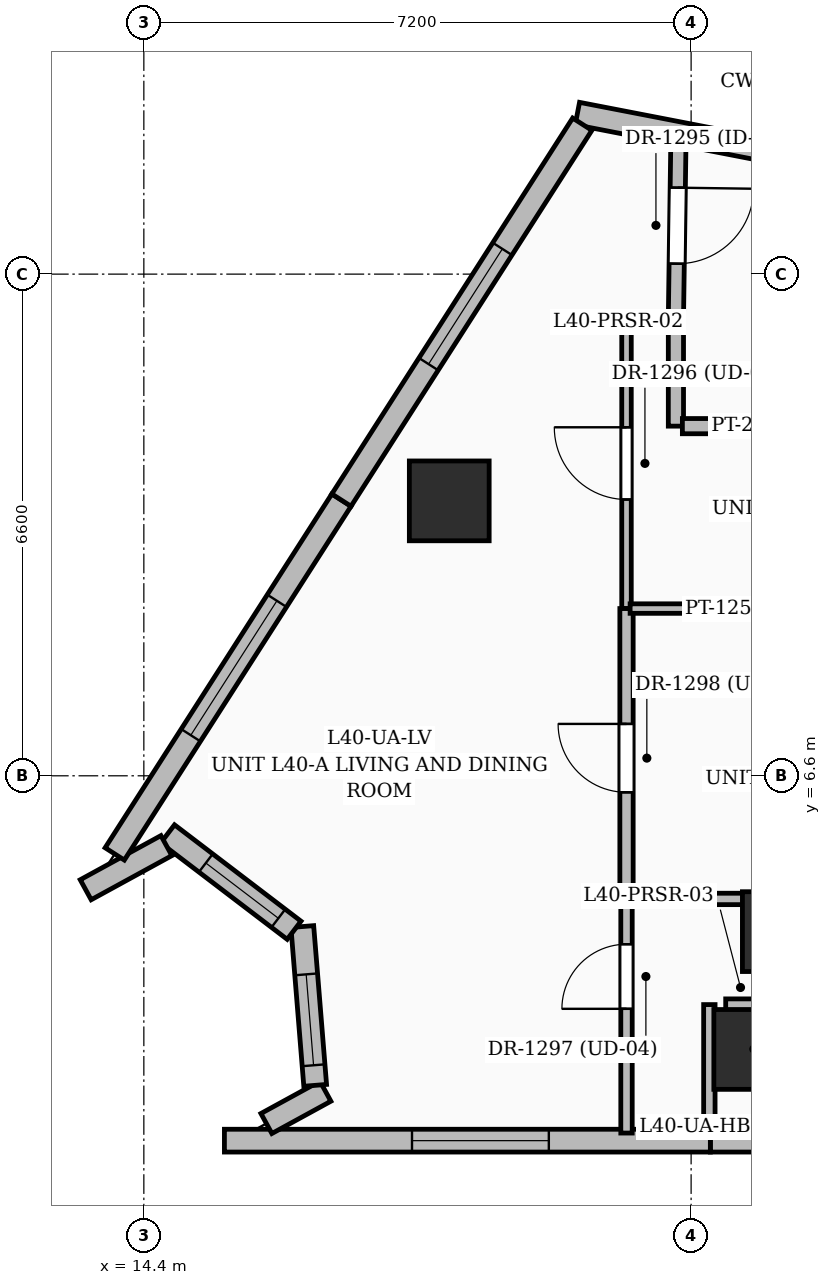
"""IFC4 building model, lengths in metres.
Left out: names, types, materials, properties, quantities, classifications, styles, units other than length and angle.
Written with IfcOpenShell. Run it as: python <this file> out.ifc"""

import sys

from ifc_helpers import new_model, si_unit, direction, frame, frame_2d, origin, origin_2d, place, context, subcontext, project, spatial, rectangle, extrude, element, fill, save


model = new_model("IFC4")
c1 = context("Model", 3, precision=1e-05, world=origin(), true_north=direction((0.0, 1.0)))
c2 = subcontext(c1, "Body", "Model", "MODEL_VIEW")
j1 = project(units=[si_unit("LENGTHUNIT", "METRE"), si_unit("PLANEANGLEUNIT", "RADIAN")], contexts=[c1])
p1 = place(None, origin())
s1 = spatial("IfcSite", under=j1, at=p1, CompositionType="ELEMENT")
p2 = place(p1, origin())
s2 = spatial("IfcBuilding", under=s1, at=p2, CompositionType="ELEMENT")
p3 = place(p2, frame((0.0, 0.0, 157.2)))
s3 = spatial("IfcBuildingStorey", under=s2, at=p3, CompositionType="ELEMENT", Elevation=157.2)
for number, where, z_axis, x_axis in (
    (1, (22.8, 4.55, 0.0), (0.0, 0.0, 1.0), (1.0, 0.0, 0.0)),
    (2, (22.424, 3.0, 0.0), (0.0, 0.0, 1.0), (1.0, 0.0, 0.0)),
    (3, (18.418, 10.217, 0.0), (0.0, 0.0, 1.0), (1.0, 0.0, 0.0)),
):
    element("IfcColumn", number, at=place(p3, frame(where, z_axis=z_axis, x_axis=x_axis)), inside=s3, PredefinedType="COLUMN", context=c2, shape_type="SweptSolid", body=[
        extrude(rectangle(XDim=1.05, YDim=1.05, at=origin_2d()), origin(), (0.0, 0.0, 1.0), 3.6),
    ])
p4 = place(p3, frame((20.104, 15.312, 0.0), z_axis=(0.0, 0.0, 1.0), x_axis=(0.98176398898, -0.190103839891, 0.0)))
e4 = element("IfcWall", 4, at=p4, inside=s3, PredefinedType="SOLIDWALL", context=c2, shape_type="SweptSolid", body=[
    extrude(rectangle(XDim=2.594, YDim=0.3, at=frame_2d((1.297, 0.0))), origin(), (0.0, 0.0, 1.0), 2.575),
])
p5 = place(p3, frame((28.246, 1.8, 0.0), z_axis=(0.0, 0.0, 1.0), x_axis=(-1.0, 0.0, 0.0)))
e5 = element("IfcWall", 5, at=p5, inside=s3, PredefinedType="SOLIDWALL", context=c2, shape_type="SweptSolid", body=[
    extrude(rectangle(XDim=6.393, YDim=0.3, at=frame_2d((3.197, 0.0))), origin(), (0.0, 0.0, 1.0), 3.35),
])
p6 = place(p5, frame((2.35, 0.0, 0.55)))
e6 = element("IfcOpeningElement", 6, at=p6, cuts=e5, PredefinedType="OPENING", context=c2, shape_type="SweptSolid", body=[
    extrude(rectangle(XDim=2.1, YDim=2.4, at=frame_2d((1.05, 1.2))), frame((0.0, 0.16, 0.0), z_axis=(0.0, -1.0, 0.0), x_axis=(1.0, 0.0, 0.0)), (0.0, 0.0, 1.0), 0.32),
])
p7 = place(p3, frame((21.853, 1.8, 0.0), z_axis=(0.0, 0.0, 1.0), x_axis=(-1.0, 0.0, 0.0)))
e7 = element("IfcWall", 7, at=p7, inside=s3, PredefinedType="SOLIDWALL", context=c2, shape_type="SweptSolid", body=[
    extrude(rectangle(XDim=6.393, YDim=0.3, at=frame_2d((3.197, 0.0))), origin(), (0.0, 0.0, 1.0), 3.35),
])
p8 = place(p7, frame((2.125, 0.0, 0.6)))
e8 = element("IfcOpeningElement", 8, at=p8, cuts=e7, PredefinedType="OPENING", context=c2, shape_type="SweptSolid", body=[
    extrude(rectangle(XDim=1.8, YDim=2.1, at=frame_2d((0.9, 1.05))), frame((0.0, 0.16, 0.0), z_axis=(0.0, -1.0, 0.0), x_axis=(1.0, 0.0, 0.0)), (0.0, 0.0, 1.0), 0.32),
])
p9 = place(p3, frame((16.012, 2.025, 0.0), z_axis=(0.0, 0.0, 1.0), x_axis=(0.877262241919, 0.480011415389, 0.0)))
e9 = element("IfcWall", 9, at=p9, inside=s3, PredefinedType="SOLIDWALL", context=c2, shape_type="SweptSolid", body=[
    extrude(rectangle(XDim=0.885, YDim=0.3, at=frame_2d((0.442, 0.0))), origin(), (0.0, 0.0, 1.0), 3.35),
])
p10 = place(p3, frame((16.654, 2.528, 0.0), z_axis=(0.0, 0.0, 1.0), x_axis=(-0.080962879454, 0.996717117416, 0.0)))
e10 = element("IfcWall", 10, at=p10, inside=s3, PredefinedType="SOLIDWALL", context=c2, shape_type="SweptSolid", body=[
    extrude(rectangle(XDim=2.096, YDim=0.3, at=frame_2d((1.048, 0.0))), origin(), (0.0, 0.0, 1.0), 3.35),
])
p11 = place(p10, frame((0.265, 0.0, 0.8)))
e11 = element("IfcOpeningElement", 11, at=p11, cuts=e10, PredefinedType="OPENING", context=c2, shape_type="SweptSolid", body=[
    extrude(rectangle(XDim=1.2, YDim=1.8, at=frame_2d((0.6, 0.9))), frame((0.0, 0.16, 0.0), z_axis=(0.0, -1.0, 0.0), x_axis=(1.0, 0.0, 0.0)), (0.0, 0.0, 1.0), 0.32),
])
p12 = place(p3, frame((16.377, 4.568, 0.0), z_axis=(0.0, 0.0, 1.0), x_axis=(-0.795383499791, 0.606106499107, 0.0)))
e12 = element("IfcWall", 12, at=p12, inside=s3, PredefinedType="SOLIDWALL", context=c2, shape_type="SweptSolid", body=[
    extrude(rectangle(XDim=2.092, YDim=0.3, at=frame_2d((1.046, 0.0))), origin(), (0.0, 0.0, 1.0), 3.35),
])
p13 = place(p12, frame((0.26, 0.0, 0.8)))
e13 = element("IfcOpeningElement", 13, at=p13, cuts=e12, PredefinedType="OPENING", context=c2, shape_type="SweptSolid", body=[
    extrude(rectangle(XDim=1.2, YDim=1.8, at=frame_2d((0.6, 0.9))), frame((0.0, 0.16, 0.0), z_axis=(0.0, -1.0, 0.0), x_axis=(1.0, 0.0, 0.0)), (0.0, 0.0, 1.0), 0.32),
])
p14 = place(p3, frame((14.697, 5.681, 0.0), z_axis=(0.0, 0.0, 1.0), x_axis=(-0.877355211776, -0.47984146587, 0.0)))
e14 = element("IfcWall", 14, at=p14, inside=s3, PredefinedType="SOLIDWALL", context=c2, shape_type="SweptSolid", body=[
    extrude(rectangle(XDim=1.21, YDim=0.3, at=frame_2d((0.605, 0.0))), origin(), (0.0, 0.0, 1.0), 3.35),
])
p15 = place(p3, frame((14.017, 5.572, 0.0), z_axis=(0.0, 0.0, 1.0), x_axis=(0.539464660722, 0.84200824214, 0.0)))
e15 = element("IfcWall", 15, at=p15, inside=s3, PredefinedType="SOLIDWALL", context=c2, shape_type="SweptSolid", body=[
    extrude(rectangle(XDim=5.529, YDim=0.3, at=frame_2d((2.764, 0.0))), origin(), (0.0, 0.0, 1.0), 3.35),
])
p16 = place(p15, frame((1.855, 0.0, 0.55)))
e16 = element("IfcOpeningElement", 16, at=p16, cuts=e15, PredefinedType="OPENING", context=c2, shape_type="SweptSolid", body=[
    extrude(rectangle(XDim=2.1, YDim=2.4, at=frame_2d((1.05, 1.2))), frame((0.0, 0.16, 0.0), z_axis=(0.0, -1.0, 0.0), x_axis=(1.0, 0.0, 0.0)), (0.0, 0.0, 1.0), 0.32),
])
p17 = place(p3, frame((17.0, 10.227, 0.0), z_axis=(0.0, 0.0, 1.0), x_axis=(0.539500668401, 0.841985171363, 0.0)))
e17 = element("IfcWall", 17, at=p17, inside=s3, PredefinedType="SOLIDWALL", context=c2, shape_type="SweptSolid", body=[
    extrude(rectangle(XDim=5.873, YDim=0.3, at=frame_2d((2.937, 0.0))), origin(), (0.0, 0.0, 1.0), 3.35),
])
p18 = place(p17, frame((2.125, 0.0, 0.6)))
e18 = element("IfcOpeningElement", 18, at=p18, cuts=e17, PredefinedType="OPENING", context=c2, shape_type="SweptSolid", body=[
    extrude(rectangle(XDim=1.8, YDim=2.1, at=frame_2d((0.9, 1.05))), frame((0.0, 0.16, 0.0), z_axis=(0.0, -1.0, 0.0), x_axis=(1.0, 0.0, 0.0)), (0.0, 0.0, 1.0), 0.32),
])
p19 = place(p3, frame((21.433, 14.956, 0.0), z_axis=(0.0, 0.0, 1.0), x_axis=(-0.014212611143, -0.999898995741, 0.0)))
e19 = element("IfcWall", 19, at=p19, inside=s3, PredefinedType="PARTITIONING", context=c2, shape_type="SweptSolid", body=[
    extrude(rectangle(XDim=2.336, YDim=0.2, at=frame_2d((1.168, 0.0))), origin(), (0.0, 0.0, 1.0), 2.57),
])
p20 = place(p19, frame((0.619, 0.0, 0.0)))
e20 = element("IfcOpeningElement", 20, at=p20, cuts=e19, PredefinedType="OPENING", context=c2, shape_type="SweptSolid", body=[
    extrude(rectangle(XDim=1.0, YDim=2.2, at=frame_2d((0.5, 1.1))), frame((0.0, 0.11, 0.0), z_axis=(0.0, -1.0, 0.0), x_axis=(1.0, 0.0, 0.0)), (0.0, 0.0, 1.0), 0.22),
])
p21 = place(p3, frame((21.4, 12.62, 0.0), z_axis=(0.0, 0.0, 1.0), x_axis=(0.0, -1.0, 0.0)))
e21 = element("IfcWall", 21, at=p21, inside=s3, PredefinedType="PARTITIONING", context=c2, shape_type="SweptSolid", body=[
    extrude(rectangle(XDim=1.42, YDim=0.2, at=frame_2d((0.71, 0.0))), origin(), (0.0, 0.0, 1.0), 3.35),
])
p22 = place(p3, frame((21.485, 11.2, 0.0), z_axis=(0.0, 0.0, 1.0), x_axis=(1.0, 0.0, 0.0)))
e22 = element("IfcWall", 22, at=p22, inside=s3, PredefinedType="PARTITIONING", context=c2, shape_type="SweptSolid", body=[
    extrude(rectangle(XDim=3.384, YDim=0.2, at=frame_2d((1.692, 0.0))), origin(), (0.0, 0.0, 1.0), 3.35),
])
p23 = place(p3, frame((20.75, 1.9, 0.0), z_axis=(0.0, 0.0, 1.0), x_axis=(0.0, 1.0, 0.0)))
e23 = element("IfcWall", 23, at=p23, inside=s3, PredefinedType="PARTITIONING", context=c2, shape_type="SweptSolid", body=[
    extrude(rectangle(XDim=3.08, YDim=0.15, at=frame_2d((1.54, 0.0))), origin(), (0.0, 0.0, 1.0), 3.35),
])
p24 = place(p23, frame((1.635, 0.0, 0.0)))
e24 = element("IfcOpeningElement", 24, at=p24, cuts=e23, PredefinedType="OPENING", context=c2, shape_type="SweptSolid", body=[
    extrude(rectangle(XDim=0.85, YDim=2.1, at=frame_2d((0.425, 1.05))), frame((0.0, 0.085, 0.0), z_axis=(0.0, -1.0, 0.0), x_axis=(1.0, 0.0, 0.0)), (0.0, 0.0, 1.0), 0.17),
])
p25 = place(p3, frame((20.75, 8.8, 0.0), z_axis=(0.0, 0.0, 1.0), x_axis=(0.0, 1.0, 0.0)))
e25 = element("IfcWall", 25, at=p25, inside=s3, PredefinedType="PARTITIONING", context=c2, shape_type="SweptSolid", body=[
    extrude(rectangle(XDim=3.82, YDim=0.125, at=frame_2d((1.91, 0.0))), origin(), (0.0, 0.0, 1.0), 2.393),
])
p26 = place(p25, frame((1.435, 0.0, 0.0)))
e26 = element("IfcOpeningElement", 26, at=p26, cuts=e25, PredefinedType="OPENING", context=c2, shape_type="SweptSolid", body=[
    extrude(rectangle(XDim=0.95, YDim=2.2, at=frame_2d((0.475, 1.1))), frame((0.0, 0.072, 0.0), z_axis=(0.0, -1.0, 0.0), x_axis=(1.0, 0.0, 0.0)), (0.0, 0.0, 1.0), 0.145),
])
p27 = place(p3, frame((20.798, 12.62, 0.0), z_axis=(0.0, 0.0, 1.0), x_axis=(1.0, 0.0, 0.0)))
e27 = element("IfcWall", 27, at=p27, inside=s3, PredefinedType="PARTITIONING", context=c2, shape_type="SweptSolid", body=[
    extrude(rectangle(XDim=0.517, YDim=0.125, at=frame_2d((0.259, 0.0))), origin(), (0.0, 0.0, 1.0), 3.35),
])
p28 = place(p3, frame((20.75, 4.98, 0.0), z_axis=(0.0, 0.0, 1.0), x_axis=(0.0, 1.0, 0.0)))
e28 = element("IfcWall", 28, at=p28, inside=s3, PredefinedType="PARTITIONING", context=c2, shape_type="SweptSolid", body=[
    extrude(rectangle(XDim=3.82, YDim=0.175, at=frame_2d((1.91, 0.0))), origin(), (0.0, 0.0, 1.0), 2.57),
])
p29 = place(p28, frame((1.403, 0.0, 0.0)))
e29 = element("IfcOpeningElement", 29, at=p29, cuts=e28, PredefinedType="OPENING", context=c2, shape_type="SweptSolid", body=[
    extrude(rectangle(XDim=0.9, YDim=2.15, at=frame_2d((0.45, 1.075))), frame((0.0, 0.097, 0.0), z_axis=(0.0, -1.0, 0.0), x_axis=(1.0, 0.0, 0.0)), (0.0, 0.0, 1.0), 0.195),
])
p30 = place(p3, frame((27.175, 4.98, 0.0), z_axis=(0.0, 0.0, 1.0), x_axis=(-1.0, 0.0, 0.0)))
e30 = element("IfcWall", 30, at=p30, inside=s3, PredefinedType="PARTITIONING", context=c2, shape_type="SweptSolid", body=[
    extrude(rectangle(XDim=6.365, YDim=0.15, at=frame_2d((3.183, 0.0))), origin(), (0.0, 0.0, 1.0), 2.57),
])
p31 = place(p3, frame((20.798, 8.8, 0.0), z_axis=(0.0, 0.0, 1.0), x_axis=(1.0, 0.0, 0.0)))
e31 = element("IfcWall", 31, at=p31, inside=s3, PredefinedType="PARTITIONING", context=c2, shape_type="SweptSolid", body=[
    extrude(rectangle(XDim=4.067, YDim=0.125, at=frame_2d((2.034, 0.0))), origin(), (0.0, 0.0, 1.0), 2.393),
])
p32 = place(p3, frame((22.2, 1.889, 0.0), z_axis=(0.0, 0.0, 1.0), x_axis=(0.0, 1.0, 0.0)))
e32 = element("IfcWall", 32, at=p32, inside=s3, PredefinedType="PARTITIONING", context=c2, shape_type="SweptSolid", body=[
    extrude(rectangle(XDim=0.02, YDim=0.15, at=frame_2d((0.01, 0.0))), origin(), (0.0, 0.0, 1.0), 3.35),
])
p33 = place(p3, frame((21.84, 1.909, 0.0), z_axis=(0.0, 0.0, 1.0), x_axis=(0.0, 1.0, 0.0)))
e33 = element("IfcWall", 33, at=p33, inside=s3, PredefinedType="PARTITIONING", context=c2, shape_type="SweptSolid", body=[
    extrude(rectangle(XDim=1.681, YDim=0.15, at=frame_2d((0.841, 0.0))), origin(), (0.0, 0.0, 1.0), 2.57),
])
p34 = place(p3, frame((22.055, 3.59, 0.0), z_axis=(0.0, 0.0, 1.0), x_axis=(1.0, 0.0, 0.0)))
e34 = element("IfcWall", 34, at=p34, inside=s3, PredefinedType="PARTITIONING", context=c2, shape_type="SweptSolid", body=[
    extrude(rectangle(XDim=0.955, YDim=0.15, at=frame_2d((0.478, 0.0))), origin(), (0.0, 0.0, 1.0), 2.57),
])
p35 = place(p8, origin())
e35 = element("IfcWindow", 35, at=p35, inside=s3, PartitioningType="SINGLE_PANEL", PredefinedType="WINDOW", context=c2, shape_type="SweptSolid", body=[
    extrude(rectangle(XDim=1.8, YDim=2.1, at=frame_2d((0.9, 1.05))), frame((0.0, 0.03, 0.0), z_axis=(0.0, -1.0, 0.0), x_axis=(1.0, 0.0, 0.0)), (0.0, 0.0, 1.0), 0.06),
])
fill(e8, e35)
p36 = place(p11, origin())
e36 = element("IfcWindow", 36, at=p36, inside=s3, PartitioningType="SINGLE_PANEL", PredefinedType="WINDOW", context=c2, shape_type="SweptSolid", body=[
    extrude(rectangle(XDim=1.2, YDim=1.8, at=frame_2d((0.6, 0.9))), frame((0.0, 0.03, 0.0), z_axis=(0.0, -1.0, 0.0), x_axis=(1.0, 0.0, 0.0)), (0.0, 0.0, 1.0), 0.06),
])
fill(e11, e36)
p37 = place(p13, origin())
e37 = element("IfcWindow", 37, at=p37, inside=s3, PartitioningType="SINGLE_PANEL", PredefinedType="WINDOW", context=c2, shape_type="SweptSolid", body=[
    extrude(rectangle(XDim=1.2, YDim=1.8, at=frame_2d((0.6, 0.9))), frame((0.0, 0.03, 0.0), z_axis=(0.0, -1.0, 0.0), x_axis=(1.0, 0.0, 0.0)), (0.0, 0.0, 1.0), 0.06),
])
fill(e13, e37)
p38 = place(p16, origin())
e38 = element("IfcWindow", 38, at=p38, inside=s3, PartitioningType="SINGLE_PANEL", PredefinedType="WINDOW", context=c2, shape_type="SweptSolid", body=[
    extrude(rectangle(XDim=2.1, YDim=2.4, at=frame_2d((1.05, 1.2))), frame((0.0, 0.03, 0.0), z_axis=(0.0, -1.0, 0.0), x_axis=(1.0, 0.0, 0.0)), (0.0, 0.0, 1.0), 0.06),
])
fill(e16, e38)
p39 = place(p18, origin())
e39 = element("IfcWindow", 39, at=p39, inside=s3, PartitioningType="SINGLE_PANEL", PredefinedType="WINDOW", context=c2, shape_type="SweptSolid", body=[
    extrude(rectangle(XDim=1.8, YDim=2.1, at=frame_2d((0.9, 1.05))), frame((0.0, 0.03, 0.0), z_axis=(0.0, -1.0, 0.0), x_axis=(1.0, 0.0, 0.0)), (0.0, 0.0, 1.0), 0.06),
])
fill(e18, e39)
p40 = place(p20, origin())
e40 = element("IfcDoor", 40, at=p40, inside=s3, OperationType="SINGLE_SWING_LEFT", PredefinedType="DOOR", context=c2, shape_type="SweptSolid", body=[
    extrude(rectangle(XDim=1.0, YDim=2.2, at=frame_2d((0.5, 1.1))), frame((0.0, 0.025, 0.0), z_axis=(0.0, -1.0, 0.0), x_axis=(1.0, 0.0, 0.0)), (0.0, 0.0, 1.0), 0.05),
])
fill(e20, e40)
p41 = place(p26, origin())
e41 = element("IfcDoor", 41, at=p41, inside=s3, OperationType="SINGLE_SWING_RIGHT", PredefinedType="DOOR", context=c2, shape_type="SweptSolid", body=[
    extrude(rectangle(XDim=0.95, YDim=2.2, at=frame_2d((0.475, 1.1))), frame((0.0, 0.025, 0.0), z_axis=(0.0, -1.0, 0.0), x_axis=(1.0, 0.0, 0.0)), (0.0, 0.0, 1.0), 0.05),
])
fill(e26, e41)
p42 = place(p24, origin())
e42 = element("IfcDoor", 42, at=p42, inside=s3, OperationType="SINGLE_SWING_LEFT", PredefinedType="DOOR", context=c2, shape_type="SweptSolid", body=[
    extrude(rectangle(XDim=0.85, YDim=2.1, at=frame_2d((0.425, 1.05))), frame((0.0, 0.025, 0.0), z_axis=(0.0, -1.0, 0.0), x_axis=(1.0, 0.0, 0.0)), (0.0, 0.0, 1.0), 0.05),
])
fill(e24, e42)
p43 = place(p29, origin())
e43 = element("IfcDoor", 43, at=p43, inside=s3, OperationType="SINGLE_SWING_RIGHT", PredefinedType="DOOR", context=c2, shape_type="SweptSolid", body=[
    extrude(rectangle(XDim=0.9, YDim=2.15, at=frame_2d((0.45, 1.075))), frame((0.0, 0.025, 0.0), z_axis=(0.0, -1.0, 0.0), x_axis=(1.0, 0.0, 0.0)), (0.0, 0.0, 1.0), 0.05),
])
fill(e29, e43)
save(model, sys.argv[1])
